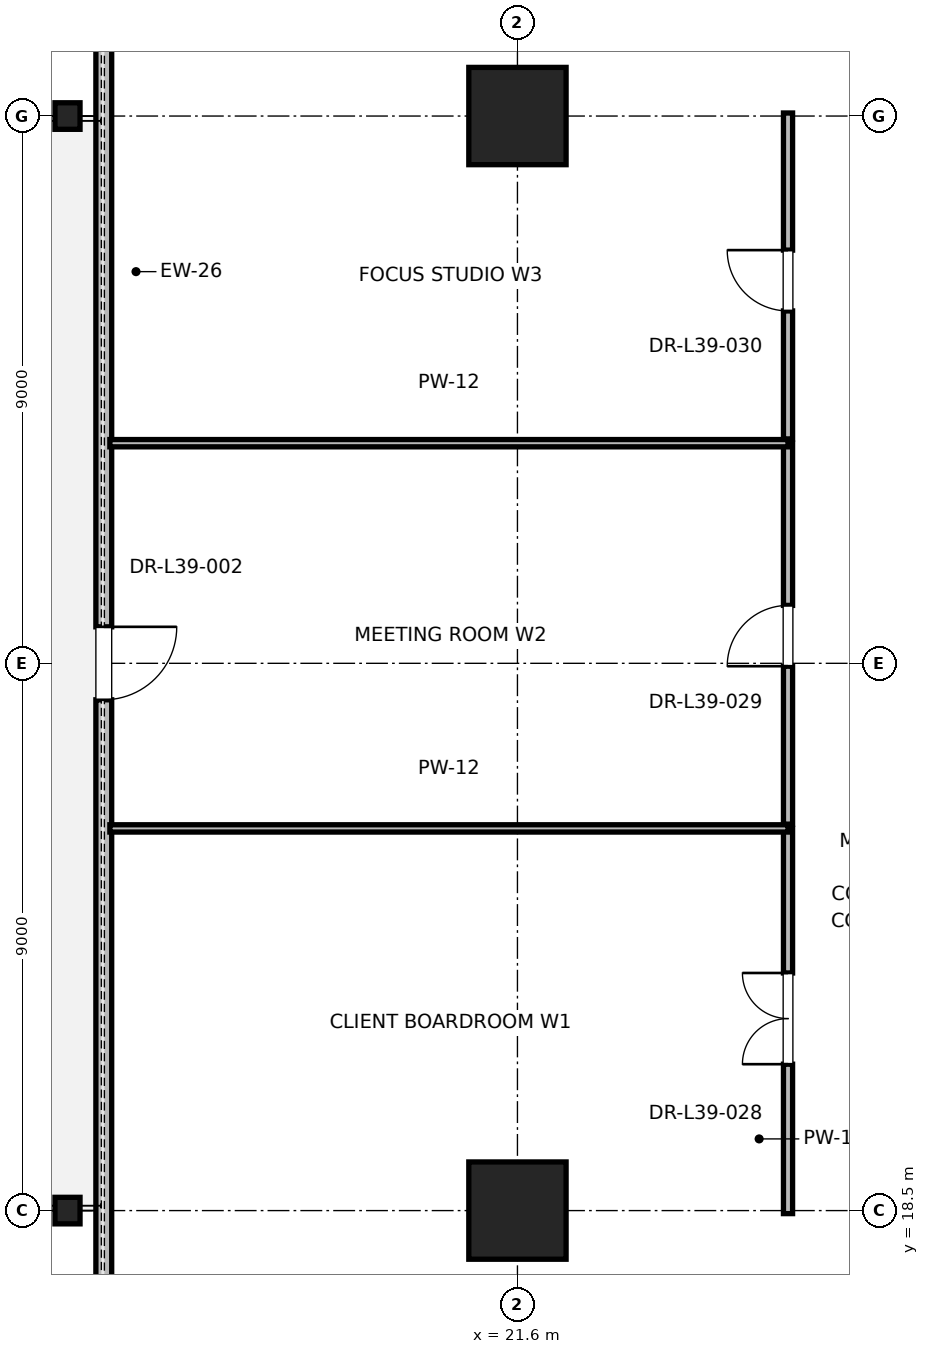
"""IFC4 building model, lengths in metres.
Left out: names, types, materials, properties, quantities, classifications, styles, units other than length and angle.
Written with IfcOpenShell. Run it as: python <this file> out.ifc"""

import sys

from ifc_helpers import new_model, si_unit, direction, frame, frame_2d, origin, origin_2d, place, context, subcontext, project, spatial, rectangle, i_section, extrude, element, fill, save


model = new_model("IFC4")
c1 = context("Model", 3, precision=1e-05, world=origin(), true_north=direction((0.0, 1.0)))
c2 = subcontext(c1, "Body", "Model", "MODEL_VIEW")
j1 = project(units=[si_unit("LENGTHUNIT", "METRE"), si_unit("PLANEANGLEUNIT", "RADIAN")], contexts=[c1])
p1 = place(None, origin())
s1 = spatial("IfcSite", under=j1, at=p1, CompositionType="ELEMENT")
p2 = place(p1, origin())
s2 = spatial("IfcBuilding", under=s1, at=p2, CompositionType="ELEMENT")
p3 = place(p2, frame((0.0, 0.0, 168.4)))
s3 = spatial("IfcBuildingStorey", under=s2, at=p3, CompositionType="ELEMENT", Elevation=168.4)
for number, where, z_axis, x_axis in (
    (1, (21.6, 18.5, 0.0), (0.0, 0.0, 1.0), (1.0, 0.0, 0.0)),
    (2, (21.6, 36.5, 0.0), (0.0, 0.0, 1.0), (1.0, 0.0, 0.0)),
):
    element("IfcColumn", number, at=place(p3, frame(where, z_axis=z_axis, x_axis=x_axis)), inside=s3, PredefinedType="COLUMN", context=c2, shape_type="SweptSolid", body=[
        extrude(rectangle(XDim=1.6, YDim=1.6, at=origin_2d()), origin(), (0.0, 0.0, 1.0), 4.0),
    ])
for number, where, z_axis, x_axis in (
    (3, (14.2, 18.5, 0.0), (0.0, 0.0, 1.0), (1.0, 0.0, 0.0)),
    (4, (14.2, 36.5, 0.0), (0.0, 0.0, 1.0), (1.0, 0.0, 0.0)),
):
    element("IfcColumn", number, at=place(p3, frame(where, z_axis=z_axis, x_axis=x_axis)), inside=s3, PredefinedType="COLUMN", context=c2, shape_type="SweptSolid", body=[
        extrude(i_section(OverallWidth=0.412, OverallDepth=0.437, WebThickness=0.036, FlangeThickness=0.058, FilletRadius=0.015, at=origin_2d()), origin(), (0.0, 0.0, 1.0), 4.0),
    ])
p4 = place(p3, frame((14.797, 45.982, 0.0), z_axis=(0.0, 0.0, 1.0), x_axis=(0.0, -1.0, 0.0)))
e5 = element("IfcWall", 5, at=p4, inside=s3, PredefinedType="PARAPET", context=c2, shape_type="SweptSolid", body=[
    extrude(rectangle(XDim=36.964, YDim=0.26, at=frame_2d((18.482, 0.0))), origin(), (0.0, 0.0, 1.0), 2.97),
])
p5 = place(p4, frame((4.2, 0.0, 0.85)))
e6 = element("IfcOpeningElement", 6, at=p5, cuts=e5, PredefinedType="OPENING", context=c2, shape_type="SweptSolid", body=[
    extrude(rectangle(XDim=2.0, YDim=2.3, at=frame_2d((1.0, 1.15))), frame((0.0, 0.13, 0.0), z_axis=(0.0, -1.0, 0.0), x_axis=(1.0, 0.0, 0.0)), (0.0, 0.0, 1.0), 0.26),
])
p6 = place(p4, frame((17.882, 0.0, 0.0)))
e7 = element("IfcOpeningElement", 7, at=p6, cuts=e5, PredefinedType="OPENING", context=c2, shape_type="SweptSolid", body=[
    extrude(rectangle(XDim=1.2, YDim=2.2, at=frame_2d((0.6, 1.1))), frame((0.0, 0.13, 0.0), z_axis=(0.0, -1.0, 0.0), x_axis=(1.0, 0.0, 0.0)), (0.0, 0.0, 1.0), 0.26),
])
p7 = place(p4, frame((30.764, 0.0, 0.85)))
e8 = element("IfcOpeningElement", 8, at=p7, cuts=e5, PredefinedType="OPENING", context=c2, shape_type="SweptSolid", body=[
    extrude(rectangle(XDim=2.0, YDim=2.3, at=frame_2d((1.0, 1.15))), frame((0.0, 0.13, 0.0), z_axis=(0.0, -1.0, 0.0), x_axis=(1.0, 0.0, 0.0)), (0.0, 0.0, 1.0), 0.26),
])
p8 = place(p3, frame((26.05, 18.45, 0.0), z_axis=(0.0, 0.0, 1.0), x_axis=(0.0, 1.0, 0.0)))
e9 = element("IfcWall", 9, at=p8, inside=s3, PredefinedType="PARTITIONING", context=c2, shape_type="SweptSolid", body=[
    extrude(rectangle(XDim=6.335, YDim=0.15, at=frame_2d((3.167, 0.0))), origin(), (0.0, 0.0, 1.0), 2.85),
])
p9 = place(p8, frame((2.458, 0.0, 0.0)))
e10 = element("IfcOpeningElement", 10, at=p9, cuts=e9, PredefinedType="OPENING", context=c2, shape_type="SweptSolid", body=[
    extrude(rectangle(XDim=1.5, YDim=2.25, at=frame_2d((0.75, 1.125))), frame((0.0, 0.075, 0.0), z_axis=(0.0, -1.0, 0.0), x_axis=(1.0, 0.0, 0.0)), (0.0, 0.0, 1.0), 0.15),
])
p10 = place(p3, frame((14.897, 24.785, 0.0), z_axis=(0.0, 0.0, 1.0), x_axis=(1.0, 0.0, 0.0)))
e11 = element("IfcWall", 11, at=p10, inside=s3, PredefinedType="PARTITIONING", context=c2, shape_type="SweptSolid", body=[
    extrude(rectangle(XDim=11.153, YDim=0.12, at=frame_2d((5.577, 0.0))), origin(), (0.0, 0.0, 1.0), 2.85),
])
p11 = place(p3, frame((26.05, 24.855, 0.0), z_axis=(0.0, 0.0, 1.0), x_axis=(0.0, 1.0, 0.0)))
e12 = element("IfcWall", 12, at=p11, inside=s3, PredefinedType="PARTITIONING", context=c2, shape_type="SweptSolid", body=[
    extrude(rectangle(XDim=6.265, YDim=0.15, at=frame_2d((3.133, 0.0))), origin(), (0.0, 0.0, 1.0), 2.85),
])
p12 = place(p11, frame((2.597, 0.0, 0.0)))
e13 = element("IfcOpeningElement", 13, at=p12, cuts=e12, PredefinedType="OPENING", context=c2, shape_type="SweptSolid", body=[
    extrude(rectangle(XDim=1.0, YDim=2.15, at=frame_2d((0.5, 1.075))), frame((0.0, 0.075, 0.0), z_axis=(0.0, -1.0, 0.0), x_axis=(1.0, 0.0, 0.0)), (0.0, 0.0, 1.0), 0.15),
])
p13 = place(p3, frame((14.897, 31.12, 0.0), z_axis=(0.0, 0.0, 1.0), x_axis=(1.0, 0.0, 0.0)))
e14 = element("IfcWall", 14, at=p13, inside=s3, PredefinedType="PARTITIONING", context=c2, shape_type="SweptSolid", body=[
    extrude(rectangle(XDim=11.153, YDim=0.12, at=frame_2d((5.577, 0.0))), origin(), (0.0, 0.0, 1.0), 2.85),
])
p14 = place(p3, frame((26.05, 31.19, 0.0), z_axis=(0.0, 0.0, 1.0), x_axis=(0.0, 1.0, 0.0)))
e15 = element("IfcWall", 15, at=p14, inside=s3, PredefinedType="PARTITIONING", context=c2, shape_type="SweptSolid", body=[
    extrude(rectangle(XDim=5.36, YDim=0.15, at=frame_2d((2.68, 0.0))), origin(), (0.0, 0.0, 1.0), 2.85),
])
p15 = place(p14, frame((2.105, 0.0, 0.0)))
e16 = element("IfcOpeningElement", 16, at=p15, cuts=e15, PredefinedType="OPENING", context=c2, shape_type="SweptSolid", body=[
    extrude(rectangle(XDim=1.0, YDim=2.15, at=frame_2d((0.5, 1.075))), frame((0.0, 0.075, 0.0), z_axis=(0.0, -1.0, 0.0), x_axis=(1.0, 0.0, 0.0)), (0.0, 0.0, 1.0), 0.15),
])
p16 = place(p6, origin())
e17 = element("IfcDoor", 17, at=p16, inside=s3, OperationType="SINGLE_SWING_LEFT", PredefinedType="DOOR", context=c2, shape_type="SweptSolid", body=[
    extrude(rectangle(XDim=1.2, YDim=2.2, at=frame_2d((0.6, 1.1))), frame((0.0, 0.025, 0.0), z_axis=(0.0, -1.0, 0.0), x_axis=(1.0, 0.0, 0.0)), (0.0, 0.0, 1.0), 0.05),
])
fill(e7, e17)
p17 = place(p9, origin())
e18 = element("IfcDoor", 18, at=p17, inside=s3, OperationType="DOUBLE_DOOR_SINGLE_SWING", PredefinedType="DOOR", context=c2, shape_type="SweptSolid", body=[
    extrude(rectangle(XDim=1.5, YDim=2.25, at=frame_2d((0.75, 1.125))), frame((0.0, 0.025, 0.0), z_axis=(0.0, -1.0, 0.0), x_axis=(1.0, 0.0, 0.0)), (0.0, 0.0, 1.0), 0.05),
])
fill(e10, e18)
p18 = place(p12, origin())
e19 = element("IfcDoor", 19, at=p18, inside=s3, OperationType="SINGLE_SWING_LEFT", PredefinedType="DOOR", context=c2, shape_type="SweptSolid", body=[
    extrude(rectangle(XDim=1.0, YDim=2.15, at=frame_2d((0.5, 1.075))), frame((0.0, 0.025, 0.0), z_axis=(0.0, -1.0, 0.0), x_axis=(1.0, 0.0, 0.0)), (0.0, 0.0, 1.0), 0.05),
])
fill(e13, e19)
p19 = place(p15, origin())
e20 = element("IfcDoor", 20, at=p19, inside=s3, OperationType="SINGLE_SWING_RIGHT", PredefinedType="DOOR", context=c2, shape_type="SweptSolid", body=[
    extrude(rectangle(XDim=1.0, YDim=2.15, at=frame_2d((0.5, 1.075))), frame((0.0, 0.025, 0.0), z_axis=(0.0, -1.0, 0.0), x_axis=(1.0, 0.0, 0.0)), (0.0, 0.0, 1.0), 0.05),
])
fill(e16, e20)
save(model, sys.argv[1])
